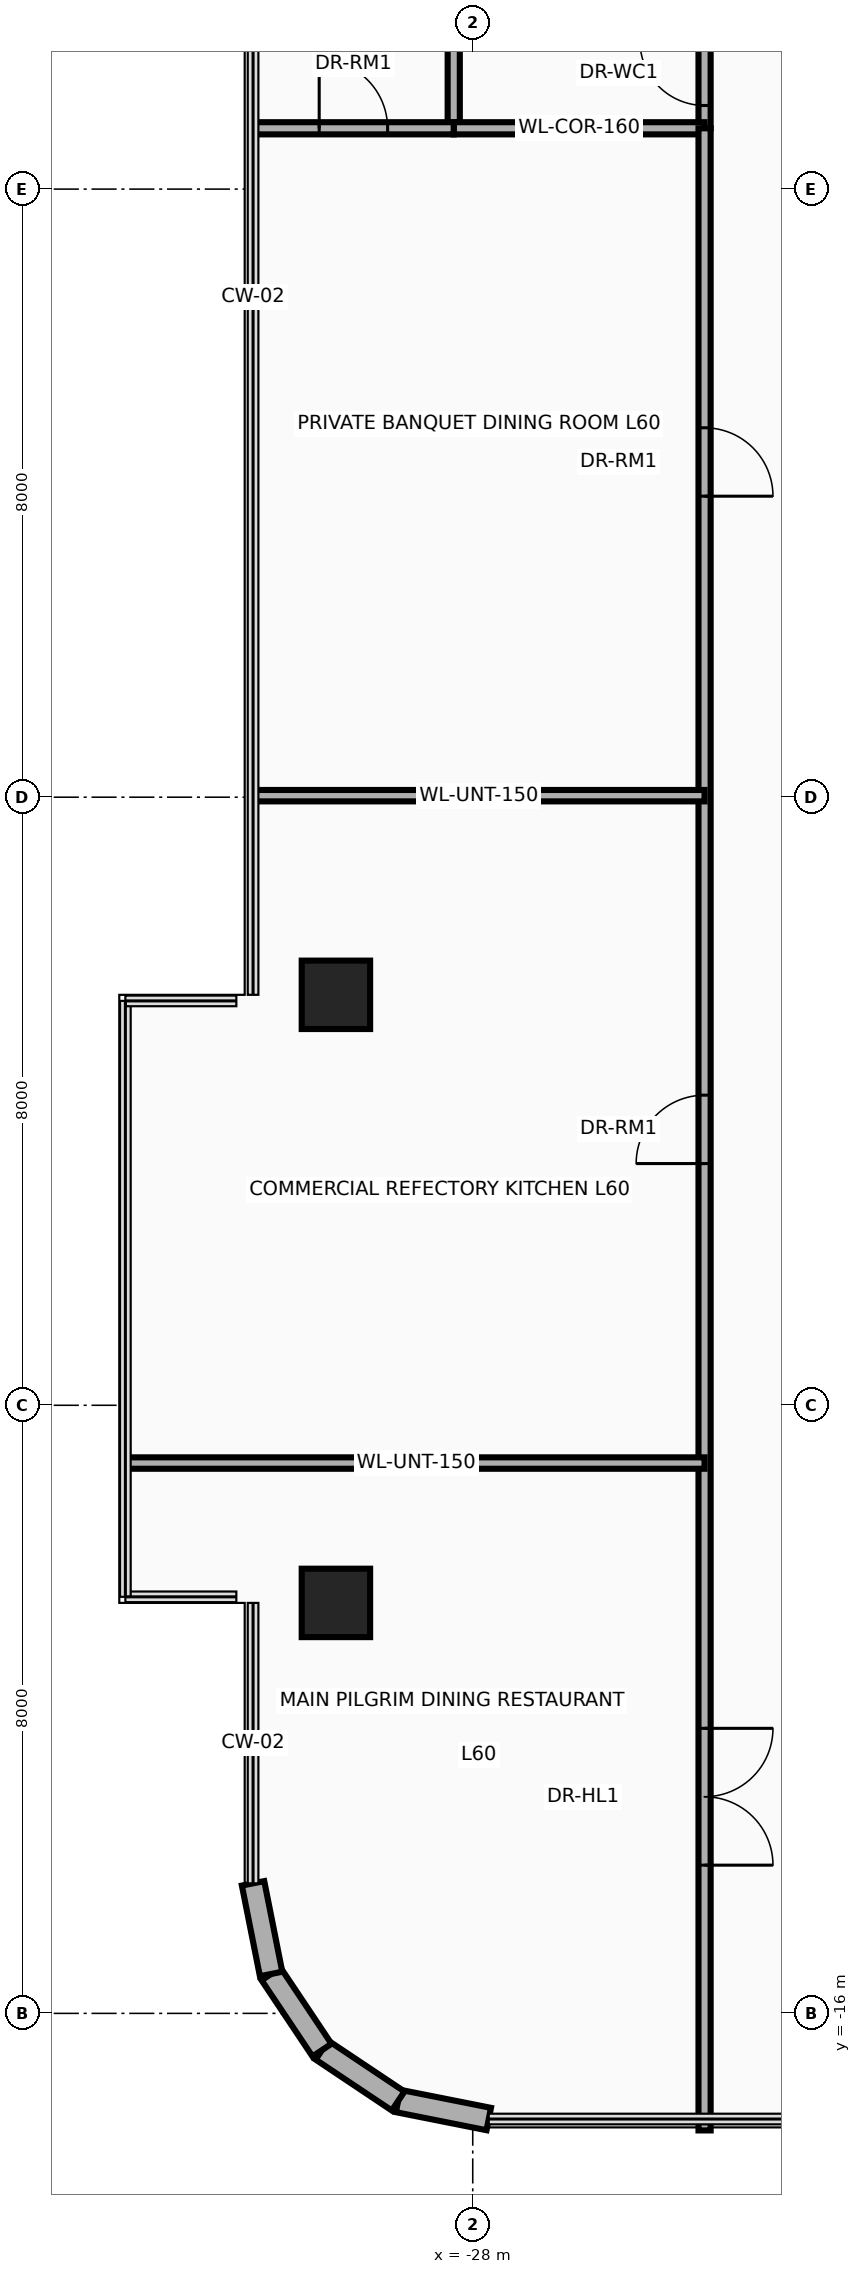
"""IFC4 building model, lengths in metres.
Left out: names, types, materials, properties, quantities, classifications, styles, units other than length and angle.
Written with IfcOpenShell. Run it as: python <this file> out.ifc"""

import sys

from ifc_helpers import new_model, si_unit, direction, frame, frame_2d, origin, origin_2d, place, context, subcontext, project, spatial, rectangle, extrude, source, transform, mapped, element, fill, save


model = new_model("IFC4")
c1 = context("Model", 3, precision=1e-05, world=origin(), true_north=direction((0.0, 1.0)))
c2 = subcontext(c1, "Body", "Model", "MODEL_VIEW")
j1 = project(units=[si_unit("LENGTHUNIT", "METRE"), si_unit("PLANEANGLEUNIT", "RADIAN")], contexts=[c1])
p1 = place(None, origin())
s1 = spatial("IfcSite", under=j1, at=p1, CompositionType="ELEMENT")
p2 = place(p1, origin())
s2 = spatial("IfcBuilding", under=s1, at=p2, CompositionType="ELEMENT")
p3 = place(p2, frame((0.0, 0.0, 233.5)))
s3 = spatial("IfcBuildingStorey", under=s2, at=p3, CompositionType="ELEMENT", Elevation=233.5)
m1 = source(origin(), c2, "Body", "SweptSolid", [
    extrude(rectangle(XDim=0.9, YDim=0.9, at=origin_2d()), origin(), (0.0, 0.0, 1.0), 3.5),
])
for number, where, z_axis, x_axis in (
    (1, (-29.8, -10.6, 0.0), (0.0, 0.0, 1.0), (1.0, 0.0, 0.0)),
    (2, (-29.8, -2.6, 0.0), (0.0, 0.0, 1.0), (1.0, 0.0, 0.0)),
):
    element("IfcColumn", number, at=place(p3, frame(where, z_axis=z_axis, x_axis=x_axis)), inside=s3, PredefinedType="COLUMN", context=c2, shape_type="MappedRepresentation", body=[
        mapped(m1, transform((0.0, 0.0, 0.0), x_axis=(1.0, 0.0, 0.0), y_axis=(0.0, 1.0, 0.0), z_axis=(0.0, 0.0, 1.0), scale=1.0)),
    ])
p4 = place(p3, frame((-27.789, -17.39, 0.0), z_axis=(0.0, 0.0, 1.0), x_axis=(-0.980804027463, 0.194996050505, 0.0)))
e3 = element("IfcWall", 3, at=p4, inside=s3, PredefinedType="SOLIDWALL", context=c2, shape_type="SweptSolid", body=[
    extrude(rectangle(XDim=1.216, YDim=0.3, at=frame_2d((0.608, 0.0))), origin(), (0.0, 0.0, 1.0), 3.26),
])
for number, where, z_axis, x_axis in (
    (4, (-28.982, -17.153, 0.0), (0.0, 0.0, 1.0), (-0.831, 0.556, 0.0)),
    (5, (-29.983, -16.483, 0.0), (0.0, 0.0, 1.0), (-0.556, 0.831, 0.0)),
):
    element("IfcWall", number, at=place(p3, frame(where, z_axis=z_axis, x_axis=x_axis)), inside=s3, PredefinedType="SOLIDWALL", context=c2, shape_type="SweptSolid", body=[
        extrude(rectangle(XDim=1.205, YDim=0.3, at=frame_2d((0.603, 0.0))), origin(), (0.0, 0.0, 1.0), 3.26),
    ])
p5 = place(p3, frame((-30.653, -15.482, 0.0), z_axis=(0.0, 0.0, 1.0), x_axis=(-0.194996050505, 0.980804027463, 0.0)))
e6 = element("IfcWall", 6, at=p5, inside=s3, PredefinedType="SOLIDWALL", context=c2, shape_type="SweptSolid", body=[
    extrude(rectangle(XDim=1.216, YDim=0.3, at=frame_2d((0.608, 0.0))), origin(), (0.0, 0.0, 1.0), 3.26),
])
p6 = place(p3, frame((-28.25, 8.8, 0.0), z_axis=(0.0, 0.0, 1.0), x_axis=(0.0, 1.0, 0.0)))
e7 = element("IfcWall", 7, at=p6, inside=s3, PredefinedType="PARTITIONING", context=c2, shape_type="SweptSolid", body=[
    extrude(rectangle(XDim=2.6, YDim=0.16, at=frame_2d((1.3, 0.0))), origin(), (0.0, 0.0, 1.0), 2.544),
])
p7 = place(p3, frame((-24.95, 8.8, 0.0), z_axis=(0.0, 0.0, 1.0), x_axis=(0.0, 1.0, 0.0)))
e8 = element("IfcWall", 8, at=p7, inside=s3, PredefinedType="PARTITIONING", context=c2, shape_type="SweptSolid", body=[
    extrude(rectangle(XDim=2.6, YDim=0.16, at=frame_2d((1.3, 0.0))), origin(), (0.0, 0.0, 1.0), 2.544),
])
p8 = place(p7, frame((0.3, 0.0, 0.0)))
e9 = element("IfcOpeningElement", 9, at=p8, cuts=e8, PredefinedType="OPENING", context=c2, shape_type="SweptSolid", body=[
    extrude(rectangle(XDim=0.85, YDim=2.1, at=frame_2d((0.425, 1.05))), frame((0.0, 0.095, 0.0), z_axis=(0.0, -1.0, 0.0), x_axis=(1.0, 0.0, 0.0)), (0.0, 0.0, 1.0), 0.19),
])
p9 = place(p7, frame((1.45, 0.0, 0.0)))
e10 = element("IfcOpeningElement", 10, at=p9, cuts=e8, PredefinedType="OPENING", context=c2, shape_type="SweptSolid", body=[
    extrude(rectangle(XDim=0.85, YDim=2.1, at=frame_2d((0.425, 1.05))), frame((0.0, 0.095, 0.0), z_axis=(0.0, -1.0, 0.0), x_axis=(1.0, 0.0, 0.0)), (0.0, 0.0, 1.0), 0.19),
])
p10 = place(p3, frame((-28.25, 8.8, 0.0), z_axis=(0.0, 0.0, 1.0), x_axis=(1.0, 0.0, 0.0)))
e11 = element("IfcWall", 11, at=p10, inside=s3, PredefinedType="PARTITIONING", context=c2, shape_type="SweptSolid", body=[
    extrude(rectangle(XDim=3.3, YDim=0.16, at=frame_2d((1.65, 0.0))), origin(), (0.0, 0.0, 1.0), 3.26),
])
p11 = place(p3, frame((-24.95, -17.54, 0.0), z_axis=(0.0, 0.0, 1.0), x_axis=(0.0, 1.0, 0.0)))
e12 = element("IfcWall", 12, at=p11, inside=s3, PredefinedType="PARTITIONING", context=c2, shape_type="SweptSolid", body=[
    extrude(rectangle(XDim=26.34, YDim=0.16, at=frame_2d((13.17, 0.0))), origin(), (0.0, 0.0, 1.0), 2.544),
])
p12 = place(p11, frame((3.49, 0.0, 0.0)))
e13 = element("IfcOpeningElement", 13, at=p12, cuts=e12, PredefinedType="OPENING", context=c2, shape_type="SweptSolid", body=[
    extrude(rectangle(XDim=1.8, YDim=2.15, at=frame_2d((0.9, 1.075))), frame((0.0, 0.095, 0.0), z_axis=(0.0, -1.0, 0.0), x_axis=(1.0, 0.0, 0.0)), (0.0, 0.0, 1.0), 0.19),
])
p13 = place(p11, frame((12.72, 0.0, 0.0)))
e14 = element("IfcOpeningElement", 14, at=p13, cuts=e12, PredefinedType="OPENING", context=c2, shape_type="SweptSolid", body=[
    extrude(rectangle(XDim=0.9, YDim=2.1, at=frame_2d((0.45, 1.05))), frame((0.0, 0.095, 0.0), z_axis=(0.0, -1.0, 0.0), x_axis=(1.0, 0.0, 0.0)), (0.0, 0.0, 1.0), 0.19),
])
p14 = place(p11, frame((21.5, 0.0, 0.0)))
e15 = element("IfcOpeningElement", 15, at=p14, cuts=e12, PredefinedType="OPENING", context=c2, shape_type="SweptSolid", body=[
    extrude(rectangle(XDim=0.9, YDim=2.1, at=frame_2d((0.45, 1.05))), frame((0.0, 0.095, 0.0), z_axis=(0.0, -1.0, 0.0), x_axis=(1.0, 0.0, 0.0)), (0.0, 0.0, 1.0), 0.19),
])
p15 = place(p3, frame((-30.89, 8.8, 0.0), z_axis=(0.0, 0.0, 1.0), x_axis=(1.0, 0.0, 0.0)))
e16 = element("IfcWall", 16, at=p15, inside=s3, PredefinedType="PARTITIONING", context=c2, shape_type="SweptSolid", body=[
    extrude(rectangle(XDim=2.64, YDim=0.16, at=frame_2d((1.32, 0.0))), origin(), (0.0, 0.0, 1.0), 2.706),
])
p16 = place(p15, frame((0.87, 0.0, 0.0)))
e17 = element("IfcOpeningElement", 17, at=p16, cuts=e16, PredefinedType="OPENING", context=c2, shape_type="SweptSolid", body=[
    extrude(rectangle(XDim=0.9, YDim=2.1, at=frame_2d((0.45, 1.05))), frame((0.0, 0.095, 0.0), z_axis=(0.0, -1.0, 0.0), x_axis=(1.0, 0.0, 0.0)), (0.0, 0.0, 1.0), 0.19),
])
p17 = place(p3, frame((-32.54, -8.76, 0.0), z_axis=(0.0, 0.0, 1.0), x_axis=(1.0, 0.0, 0.0)))
e18 = element("IfcWall", 18, at=p17, inside=s3, PredefinedType="PARTITIONING", context=c2, shape_type="SweptSolid", body=[
    extrude(rectangle(XDim=7.59, YDim=0.15, at=frame_2d((3.795, 0.0))), origin(), (0.0, 0.0, 1.0), 2.706),
])
p18 = place(p3, frame((-30.89, 0.02, 0.0), z_axis=(0.0, 0.0, 1.0), x_axis=(1.0, 0.0, 0.0)))
e19 = element("IfcWall", 19, at=p18, inside=s3, PredefinedType="PARTITIONING", context=c2, shape_type="SweptSolid", body=[
    extrude(rectangle(XDim=5.94, YDim=0.15, at=frame_2d((2.97, 0.0))), origin(), (0.0, 0.0, 1.0), 2.706),
])
p19 = place(p8, origin())
e20 = element("IfcDoor", 20, at=p19, inside=s3, OperationType="SINGLE_SWING_RIGHT", PredefinedType="DOOR", context=c2, shape_type="SweptSolid", body=[
    extrude(rectangle(XDim=0.85, YDim=2.1, at=frame_2d((0.425, 1.05))), frame((0.0, 0.025, 0.0), z_axis=(0.0, -1.0, 0.0), x_axis=(1.0, 0.0, 0.0)), (0.0, 0.0, 1.0), 0.05),
])
fill(e9, e20)
p20 = place(p16, origin())
e21 = element("IfcDoor", 21, at=p20, inside=s3, OperationType="SINGLE_SWING_RIGHT", PredefinedType="DOOR", context=c2, shape_type="SweptSolid", body=[
    extrude(rectangle(XDim=0.9, YDim=2.1, at=frame_2d((0.45, 1.05))), frame((0.0, 0.025, 0.0), z_axis=(0.0, -1.0, 0.0), x_axis=(1.0, 0.0, 0.0)), (0.0, 0.0, 1.0), 0.05),
])
fill(e17, e21)
p21 = place(p12, frame((1.8, 0.0, 0.0), z_axis=(0.0, 0.0, 1.0), x_axis=(-1.0, 0.0, 0.0)))
e22 = element("IfcDoor", 22, at=p21, inside=s3, OperationType="DOUBLE_DOOR_SINGLE_SWING", PredefinedType="DOOR", context=c2, shape_type="SweptSolid", body=[
    extrude(rectangle(XDim=1.8, YDim=2.15, at=frame_2d((0.9, 1.075))), frame((0.0, 0.025, 0.0), z_axis=(0.0, -1.0, 0.0), x_axis=(1.0, 0.0, 0.0)), (0.0, 0.0, 1.0), 0.05),
])
fill(e13, e22)
p22 = place(p13, origin())
e23 = element("IfcDoor", 23, at=p22, inside=s3, OperationType="SINGLE_SWING_RIGHT", PredefinedType="DOOR", context=c2, shape_type="SweptSolid", body=[
    extrude(rectangle(XDim=0.9, YDim=2.1, at=frame_2d((0.45, 1.05))), frame((0.0, 0.025, 0.0), z_axis=(0.0, -1.0, 0.0), x_axis=(1.0, 0.0, 0.0)), (0.0, 0.0, 1.0), 0.05),
])
fill(e14, e23)
p23 = place(p14, frame((0.9, 0.0, 0.0), z_axis=(0.0, 0.0, 1.0), x_axis=(-1.0, 0.0, 0.0)))
e24 = element("IfcDoor", 24, at=p23, inside=s3, OperationType="SINGLE_SWING_LEFT", PredefinedType="DOOR", context=c2, shape_type="SweptSolid", body=[
    extrude(rectangle(XDim=0.9, YDim=2.1, at=frame_2d((0.45, 1.05))), frame((0.0, 0.025, 0.0), z_axis=(0.0, -1.0, 0.0), x_axis=(1.0, 0.0, 0.0)), (0.0, 0.0, 1.0), 0.05),
])
fill(e15, e24)
save(model, sys.argv[1])
